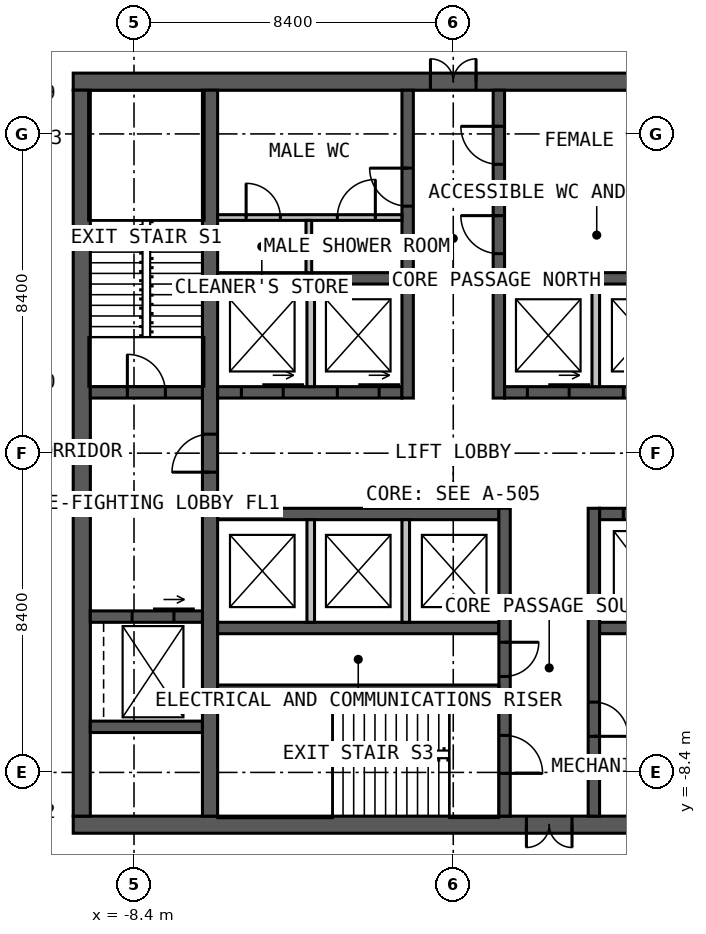
"""IFC4 building model, lengths in metres.
Left out: names, types, materials, properties, quantities, classifications, styles, units other than length and angle.
Written with IfcOpenShell. Run it as: python <this file> out.ifc"""

import sys

from ifc_helpers import new_model, si_unit, direction, frame, frame_2d, origin, place, context, subcontext, project, spatial, rectangle, extrude, element, fill, save


model = new_model("IFC4")
c1 = context("Model", 3, precision=1e-05, world=origin(), true_north=direction((0.0, 1.0)))
c2 = subcontext(c1, "Body", "Model", "MODEL_VIEW")
j1 = project(units=[si_unit("LENGTHUNIT", "METRE"), si_unit("PLANEANGLEUNIT", "RADIAN")], contexts=[c1])
p1 = place(None, origin())
s1 = spatial("IfcSite", under=j1, at=p1, CompositionType="ELEMENT")
p2 = place(p1, origin())
s2 = spatial("IfcBuilding", under=s1, at=p2, CompositionType="ELEMENT")
p3 = place(p2, frame((0.0, 0.0, 183.0)))
s3 = spatial("IfcBuildingStorey", under=s2, at=p3, CompositionType="ELEMENT", Elevation=183.0)
p4 = place(p3, frame((-10.0, 9.775, 0.0), z_axis=(0.0, 0.0, 1.0), x_axis=(1.0, 0.0, 0.0)))
e1 = element("IfcWall", 1, at=p4, inside=s3, PredefinedType="SOLIDWALL", context=c2, shape_type="SweptSolid", body=[
    extrude(rectangle(XDim=20.0, YDim=0.45, at=frame_2d((10.0, 0.0))), origin(), (0.0, 0.0, 1.0), 4.0),
])
p5 = place(p4, frame((9.4, 0.0, 0.0)))
e2 = element("IfcOpeningElement", 2, at=p5, cuts=e1, PredefinedType="OPENING", context=c2, shape_type="SweptSolid", body=[
    extrude(rectangle(XDim=1.2, YDim=2.2, at=frame_2d((0.6, 1.1))), frame((0.0, 0.235, 0.0), z_axis=(0.0, -1.0, 0.0), x_axis=(1.0, 0.0, 0.0)), (0.0, 0.0, 1.0), 0.47),
])
p6 = place(p3, frame((10.0, -9.775, 0.0), z_axis=(0.0, 0.0, 1.0), x_axis=(-1.0, 0.0, 0.0)))
e3 = element("IfcWall", 3, at=p6, inside=s3, PredefinedType="SOLIDWALL", context=c2, shape_type="SweptSolid", body=[
    extrude(rectangle(XDim=20.0, YDim=0.45, at=frame_2d((10.0, 0.0))), origin(), (0.0, 0.0, 1.0), 4.0),
])
p7 = place(p6, frame((6.875, 0.0, 0.0)))
e4 = element("IfcOpeningElement", 4, at=p7, cuts=e3, PredefinedType="OPENING", context=c2, shape_type="SweptSolid", body=[
    extrude(rectangle(XDim=1.2, YDim=2.2, at=frame_2d((0.6, 1.1))), frame((0.0, 0.235, 0.0), z_axis=(0.0, -1.0, 0.0), x_axis=(1.0, 0.0, 0.0)), (0.0, 0.0, 1.0), 0.47),
])
p8 = place(p3, frame((-9.775, 9.55, 0.0), z_axis=(0.0, 0.0, 1.0), x_axis=(0.0, -1.0, 0.0)))
e5 = element("IfcWall", 5, at=p8, inside=s3, PredefinedType="SOLIDWALL", context=c2, shape_type="SweptSolid", body=[
    extrude(rectangle(XDim=19.1, YDim=0.45, at=frame_2d((9.55, 0.0))), origin(), (0.0, 0.0, 1.0), 4.0),
])
p9 = place(p3, frame((-6.4, -9.55, 0.0), z_axis=(0.0, 0.0, 1.0), x_axis=(0.0, 1.0, 0.0)))
e6 = element("IfcWall", 6, at=p9, inside=s3, PredefinedType="SOLIDWALL", context=c2, shape_type="SweptSolid", body=[
    extrude(rectangle(XDim=19.1, YDim=0.4, at=frame_2d((9.55, 0.0))), origin(), (0.0, 0.0, 1.0), 4.0),
])
p10 = place(p9, frame((9.05, 0.0, 0.0)))
e7 = element("IfcOpeningElement", 7, at=p10, cuts=e6, PredefinedType="OPENING", context=c2, shape_type="SweptSolid", body=[
    extrude(rectangle(XDim=1.0, YDim=2.2, at=frame_2d((0.5, 1.1))), frame((0.0, 0.21, 0.0), z_axis=(0.0, -1.0, 0.0), x_axis=(1.0, 0.0, 0.0)), (0.0, 0.0, 1.0), 0.42),
])
p11 = place(p3, frame((-6.2, 1.6, 0.0), z_axis=(0.0, 0.0, 1.0), x_axis=(1.0, 0.0, 0.0)))
e8 = element("IfcWall", 8, at=p11, inside=s3, PredefinedType="SOLIDWALL", context=c2, shape_type="SweptSolid", body=[
    extrude(rectangle(XDim=4.85, YDim=0.3, at=frame_2d((2.425, 0.0))), origin(), (0.0, 0.0, 1.0), 4.0),
])
p12 = place(p11, frame((0.625, 0.0, 0.0)))
e9 = element("IfcOpeningElement", 9, at=p12, cuts=e8, PredefinedType="OPENING", context=c2, shape_type="SweptSolid", body=[
    extrude(rectangle(XDim=1.1, YDim=2.2, at=frame_2d((0.55, 1.1))), frame((0.0, 0.16, 0.0), z_axis=(0.0, -1.0, 0.0), x_axis=(1.0, 0.0, 0.0)), (0.0, 0.0, 1.0), 0.32),
])
p13 = place(p11, frame((3.15, 0.0, 0.0)))
e10 = element("IfcOpeningElement", 10, at=p13, cuts=e8, PredefinedType="OPENING", context=c2, shape_type="SweptSolid", body=[
    extrude(rectangle(XDim=1.1, YDim=2.2, at=frame_2d((0.55, 1.1))), frame((0.0, 0.16, 0.0), z_axis=(0.0, -1.0, 0.0), x_axis=(1.0, 0.0, 0.0)), (0.0, 0.0, 1.0), 0.32),
])
p14 = place(p3, frame((1.35, 1.6, 0.0), z_axis=(0.0, 0.0, 1.0), x_axis=(1.0, 0.0, 0.0)))
e11 = element("IfcWall", 11, at=p14, inside=s3, PredefinedType="SOLIDWALL", context=c2, shape_type="SweptSolid", body=[
    extrude(rectangle(XDim=4.85, YDim=0.3, at=frame_2d((2.425, 0.0))), origin(), (0.0, 0.0, 1.0), 4.0),
])
p15 = place(p14, frame((0.6, 0.0, 0.0)))
e12 = element("IfcOpeningElement", 12, at=p15, cuts=e11, PredefinedType="OPENING", context=c2, shape_type="SweptSolid", body=[
    extrude(rectangle(XDim=1.1, YDim=2.2, at=frame_2d((0.55, 1.1))), frame((0.0, 0.16, 0.0), z_axis=(0.0, -1.0, 0.0), x_axis=(1.0, 0.0, 0.0)), (0.0, 0.0, 1.0), 0.32),
])
p16 = place(p14, frame((3.125, 0.0, 0.0)))
e13 = element("IfcOpeningElement", 13, at=p16, cuts=e11, PredefinedType="OPENING", context=c2, shape_type="SweptSolid", body=[
    extrude(rectangle(XDim=1.1, YDim=2.2, at=frame_2d((0.55, 1.1))), frame((0.0, 0.16, 0.0), z_axis=(0.0, -1.0, 0.0), x_axis=(1.0, 0.0, 0.0)), (0.0, 0.0, 1.0), 0.32),
])
for number, where, z_axis, x_axis in (
    (14, (-6.2, 4.6, 0.0), (0.0, 0.0, 1.0), (1.0, 0.0, 0.0)),
    (15, (1.35, 4.6, 0.0), (0.0, 0.0, 1.0), (1.0, 0.0, 0.0)),
):
    element("IfcWall", number, at=place(p3, frame(where, z_axis=z_axis, x_axis=x_axis)), inside=s3, PredefinedType="SOLIDWALL", context=c2, shape_type="SweptSolid", body=[
        extrude(rectangle(XDim=4.85, YDim=0.3, at=frame_2d((2.425, 0.0))), origin(), (0.0, 0.0, 1.0), 4.0),
    ])
p17 = place(p3, frame((-1.2, 1.45, 0.0), z_axis=(0.0, 0.0, 1.0), x_axis=(0.0, 1.0, 0.0)))
e16 = element("IfcWall", 16, at=p17, inside=s3, PredefinedType="SOLIDWALL", context=c2, shape_type="SweptSolid", body=[
    extrude(rectangle(XDim=8.1, YDim=0.3, at=frame_2d((4.05, 0.0))), origin(), (0.0, 0.0, 1.0), 4.0),
])
p18 = place(p17, frame((5.05, 0.0, 0.0)))
e17 = element("IfcOpeningElement", 17, at=p18, cuts=e16, PredefinedType="OPENING", context=c2, shape_type="SweptSolid", body=[
    extrude(rectangle(XDim=1.0, YDim=2.2, at=frame_2d((0.5, 1.1))), frame((0.0, 0.16, 0.0), z_axis=(0.0, -1.0, 0.0), x_axis=(1.0, 0.0, 0.0)), (0.0, 0.0, 1.0), 0.32),
])
p19 = place(p3, frame((1.2, 1.45, 0.0), z_axis=(0.0, 0.0, 1.0), x_axis=(0.0, 1.0, 0.0)))
e18 = element("IfcWall", 18, at=p19, inside=s3, PredefinedType="SOLIDWALL", context=c2, shape_type="SweptSolid", body=[
    extrude(rectangle(XDim=8.1, YDim=0.3, at=frame_2d((4.05, 0.0))), origin(), (0.0, 0.0, 1.0), 4.0),
])
p20 = place(p19, frame((3.8, 0.0, 0.0)))
e19 = element("IfcOpeningElement", 19, at=p20, cuts=e18, PredefinedType="OPENING", context=c2, shape_type="SweptSolid", body=[
    extrude(rectangle(XDim=1.0, YDim=2.2, at=frame_2d((0.5, 1.1))), frame((0.0, 0.16, 0.0), z_axis=(0.0, -1.0, 0.0), x_axis=(1.0, 0.0, 0.0)), (0.0, 0.0, 1.0), 0.32),
])
p21 = place(p19, frame((6.15, 0.0, 0.0)))
e20 = element("IfcOpeningElement", 20, at=p21, cuts=e18, PredefinedType="OPENING", context=c2, shape_type="SweptSolid", body=[
    extrude(rectangle(XDim=1.0, YDim=2.2, at=frame_2d((0.5, 1.1))), frame((0.0, 0.16, 0.0), z_axis=(0.0, -1.0, 0.0), x_axis=(1.0, 0.0, 0.0)), (0.0, 0.0, 1.0), 0.32),
])
p22 = place(p3, frame((-6.2, -1.6, 0.0), z_axis=(0.0, 0.0, 1.0), x_axis=(1.0, 0.0, 0.0)))
e21 = element("IfcWall", 21, at=p22, inside=s3, PredefinedType="SOLIDWALL", context=c2, shape_type="SweptSolid", body=[
    extrude(rectangle(XDim=7.4, YDim=0.3, at=frame_2d((3.7, 0.0))), origin(), (0.0, 0.0, 1.0), 4.0),
])
p23 = place(p3, frame((3.85, -1.6, 0.0), z_axis=(0.0, 0.0, 1.0), x_axis=(1.0, 0.0, 0.0)))
e22 = element("IfcWall", 22, at=p23, inside=s3, PredefinedType="SOLIDWALL", context=c2, shape_type="SweptSolid", body=[
    extrude(rectangle(XDim=2.35, YDim=0.3, at=frame_2d((1.175, 0.0))), origin(), (0.0, 0.0, 1.0), 4.0),
])
p24 = place(p23, frame((0.625, 0.0, 0.0)))
e23 = element("IfcOpeningElement", 23, at=p24, cuts=e22, PredefinedType="OPENING", context=c2, shape_type="SweptSolid", body=[
    extrude(rectangle(XDim=1.1, YDim=2.2, at=frame_2d((0.55, 1.1))), frame((0.0, 0.16, 0.0), z_axis=(0.0, -1.0, 0.0), x_axis=(1.0, 0.0, 0.0)), (0.0, 0.0, 1.0), 0.32),
])
p25 = place(p3, frame((-6.2, -4.6, 0.0), z_axis=(0.0, 0.0, 1.0), x_axis=(1.0, 0.0, 0.0)))
e24 = element("IfcWall", 24, at=p25, inside=s3, PredefinedType="SOLIDWALL", context=c2, shape_type="SweptSolid", body=[
    extrude(rectangle(XDim=7.4, YDim=0.3, at=frame_2d((3.7, 0.0))), origin(), (0.0, 0.0, 1.0), 4.0),
])
p26 = place(p3, frame((3.85, -4.6, 0.0), z_axis=(0.0, 0.0, 1.0), x_axis=(1.0, 0.0, 0.0)))
e25 = element("IfcWall", 25, at=p26, inside=s3, PredefinedType="SOLIDWALL", context=c2, shape_type="SweptSolid", body=[
    extrude(rectangle(XDim=2.35, YDim=0.3, at=frame_2d((1.175, 0.0))), origin(), (0.0, 0.0, 1.0), 4.0),
])
p27 = place(p3, frame((1.35, -1.45, 0.0), z_axis=(0.0, 0.0, 1.0), x_axis=(0.0, -1.0, 0.0)))
e26 = element("IfcWall", 26, at=p27, inside=s3, PredefinedType="SOLIDWALL", context=c2, shape_type="SweptSolid", body=[
    extrude(rectangle(XDim=8.1, YDim=0.3, at=frame_2d((4.05, 0.0))), origin(), (0.0, 0.0, 1.0), 4.0),
])
p28 = place(p27, frame((5.975, 0.0, 0.0)))
e27 = element("IfcOpeningElement", 27, at=p28, cuts=e26, PredefinedType="OPENING", context=c2, shape_type="SweptSolid", body=[
    extrude(rectangle(XDim=1.0, YDim=2.2, at=frame_2d((0.5, 1.1))), frame((0.0, 0.16, 0.0), z_axis=(0.0, -1.0, 0.0), x_axis=(1.0, 0.0, 0.0)), (0.0, 0.0, 1.0), 0.32),
])
p29 = place(p27, frame((3.525, 0.0, 0.0)))
e28 = element("IfcOpeningElement", 28, at=p29, cuts=e26, PredefinedType="OPENING", context=c2, shape_type="SweptSolid", body=[
    extrude(rectangle(XDim=0.9, YDim=2.2, at=frame_2d((0.45, 1.1))), frame((0.0, 0.16, 0.0), z_axis=(0.0, -1.0, 0.0), x_axis=(1.0, 0.0, 0.0)), (0.0, 0.0, 1.0), 0.32),
])
p30 = place(p3, frame((3.7, -1.45, 0.0), z_axis=(0.0, 0.0, 1.0), x_axis=(0.0, -1.0, 0.0)))
e29 = element("IfcWall", 29, at=p30, inside=s3, PredefinedType="SOLIDWALL", context=c2, shape_type="SweptSolid", body=[
    extrude(rectangle(XDim=8.1, YDim=0.3, at=frame_2d((4.05, 0.0))), origin(), (0.0, 0.0, 1.0), 4.0),
])
p31 = place(p30, frame((5.1, 0.0, 0.0)))
e30 = element("IfcOpeningElement", 30, at=p31, cuts=e29, PredefinedType="OPENING", context=c2, shape_type="SweptSolid", body=[
    extrude(rectangle(XDim=0.9, YDim=2.2, at=frame_2d((0.45, 1.1))), frame((0.0, 0.16, 0.0), z_axis=(0.0, -1.0, 0.0), x_axis=(1.0, 0.0, 0.0)), (0.0, 0.0, 1.0), 0.32),
])
p32 = place(p3, frame((-6.2, -6.2, 0.0), z_axis=(0.0, 0.0, 1.0), x_axis=(1.0, 0.0, 0.0)))
e31 = element("IfcWall", 31, at=p32, inside=s3, PredefinedType="SOLIDWALL", context=c2, shape_type="SweptSolid", body=[
    extrude(rectangle(XDim=7.4, YDim=0.2, at=frame_2d((3.7, 0.0))), origin(), (0.0, 0.0, 1.0), 4.0),
])
p33 = place(p3, frame((-9.55, 1.6, 0.0), z_axis=(0.0, 0.0, 1.0), x_axis=(1.0, 0.0, 0.0)))
e32 = element("IfcWall", 32, at=p33, inside=s3, PredefinedType="SOLIDWALL", context=c2, shape_type="SweptSolid", body=[
    extrude(rectangle(XDim=2.95, YDim=0.3, at=frame_2d((1.475, 0.0))), origin(), (0.0, 0.0, 1.0), 4.0),
])
p34 = place(p33, frame((0.975, 0.0, 0.0)))
e33 = element("IfcOpeningElement", 33, at=p34, cuts=e32, PredefinedType="OPENING", context=c2, shape_type="SweptSolid", body=[
    extrude(rectangle(XDim=1.0, YDim=2.2, at=frame_2d((0.5, 1.1))), frame((0.0, 0.16, 0.0), z_axis=(0.0, -1.0, 0.0), x_axis=(1.0, 0.0, 0.0)), (0.0, 0.0, 1.0), 0.32),
])
p35 = place(p3, frame((-9.55, -4.3, 0.0), z_axis=(0.0, 0.0, 1.0), x_axis=(1.0, 0.0, 0.0)))
e34 = element("IfcWall", 34, at=p35, inside=s3, PredefinedType="SOLIDWALL", context=c2, shape_type="SweptSolid", body=[
    extrude(rectangle(XDim=2.95, YDim=0.3, at=frame_2d((1.475, 0.0))), origin(), (0.0, 0.0, 1.0), 4.0),
])
p36 = place(p35, frame((1.1, 0.0, 0.0)))
e35 = element("IfcOpeningElement", 35, at=p36, cuts=e34, PredefinedType="OPENING", context=c2, shape_type="SweptSolid", body=[
    extrude(rectangle(XDim=1.1, YDim=2.2, at=frame_2d((0.55, 1.1))), frame((0.0, 0.16, 0.0), z_axis=(0.0, -1.0, 0.0), x_axis=(1.0, 0.0, 0.0)), (0.0, 0.0, 1.0), 0.32),
])
p37 = place(p3, frame((-9.55, -7.2, 0.0), z_axis=(0.0, 0.0, 1.0), x_axis=(1.0, 0.0, 0.0)))
e36 = element("IfcWall", 36, at=p37, inside=s3, PredefinedType="SOLIDWALL", context=c2, shape_type="SweptSolid", body=[
    extrude(rectangle(XDim=2.95, YDim=0.3, at=frame_2d((1.475, 0.0))), origin(), (0.0, 0.0, 1.0), 4.0),
])
for number, where, z_axis, x_axis in (
    (37, (-3.75, 1.75, 0.0), (0.0, 0.0, 1.0), (0.0, 1.0, 0.0)),
    (38, (3.75, 1.75, 0.0), (0.0, 0.0, 1.0), (0.0, 1.0, 0.0)),
    (39, (-3.75, -1.75, 0.0), (0.0, 0.0, 1.0), (0.0, -1.0, 0.0)),
    (40, (-1.25, -1.75, 0.0), (0.0, 0.0, 1.0), (0.0, -1.0, 0.0)),
):
    element("IfcWall", number, at=place(p3, frame(where, z_axis=z_axis, x_axis=x_axis)), inside=s3, PredefinedType="SOLIDWALL", context=c2, shape_type="SweptSolid", body=[
        extrude(rectangle(XDim=2.7, YDim=0.2, at=frame_2d((1.35, 0.0))), origin(), (0.0, 0.0, 1.0), 3.75),
    ])
p38 = place(p3, frame((1.35, 6.8, 0.0), z_axis=(0.0, 0.0, 1.0), x_axis=(1.0, 0.0, 0.0)))
e41 = element("IfcWall", 41, at=p38, inside=s3, PredefinedType="PARTITIONING", context=c2, shape_type="SweptSolid", body=[
    extrude(rectangle(XDim=4.85, YDim=0.15, at=frame_2d((2.425, 0.0))), origin(), (0.0, 0.0, 1.0), 3.75),
])
p39 = place(p3, frame((-6.2, 6.2, 0.0), z_axis=(0.0, 0.0, 1.0), x_axis=(1.0, 0.0, 0.0)))
e42 = element("IfcWall", 42, at=p39, inside=s3, PredefinedType="PARTITIONING", context=c2, shape_type="SweptSolid", body=[
    extrude(rectangle(XDim=4.85, YDim=0.15, at=frame_2d((2.425, 0.0))), origin(), (0.0, 0.0, 1.0), 3.75),
])
p40 = place(p39, frame((3.15, 0.0, 0.0)))
e43 = element("IfcOpeningElement", 43, at=p40, cuts=e42, PredefinedType="OPENING", context=c2, shape_type="SweptSolid", body=[
    extrude(rectangle(XDim=1.0, YDim=2.2, at=frame_2d((0.5, 1.1))), frame((0.0, 0.085, 0.0), z_axis=(0.0, -1.0, 0.0), x_axis=(1.0, 0.0, 0.0)), (0.0, 0.0, 1.0), 0.17),
])
p41 = place(p39, frame((0.75, 0.0, 0.0)))
e44 = element("IfcOpeningElement", 44, at=p41, cuts=e42, PredefinedType="OPENING", context=c2, shape_type="SweptSolid", body=[
    extrude(rectangle(XDim=0.9, YDim=2.2, at=frame_2d((0.45, 1.1))), frame((0.0, 0.085, 0.0), z_axis=(0.0, -1.0, 0.0), x_axis=(1.0, 0.0, 0.0)), (0.0, 0.0, 1.0), 0.17),
])
p42 = place(p3, frame((-3.8, 4.75, 0.0), z_axis=(0.0, 0.0, 1.0), x_axis=(0.0, 1.0, 0.0)))
e45 = element("IfcWall", 45, at=p42, inside=s3, PredefinedType="PARTITIONING", context=c2, shape_type="SweptSolid", body=[
    extrude(rectangle(XDim=1.375, YDim=0.15, at=frame_2d((0.688, 0.0))), origin(), (0.0, 0.0, 1.0), 3.75),
])
p43 = place(p5, origin())
e46 = element("IfcDoor", 46, at=p43, inside=s3, OperationType="DOUBLE_DOOR_SINGLE_SWING", PredefinedType="DOOR", context=c2, shape_type="SweptSolid", body=[
    extrude(rectangle(XDim=1.2, YDim=2.2, at=frame_2d((0.6, 1.1))), frame((0.0, 0.025, 0.0), z_axis=(0.0, -1.0, 0.0), x_axis=(1.0, 0.0, 0.0)), (0.0, 0.0, 1.0), 0.05),
])
fill(e2, e46)
p44 = place(p7, origin())
e47 = element("IfcDoor", 47, at=p44, inside=s3, OperationType="DOUBLE_DOOR_SINGLE_SWING", PredefinedType="DOOR", context=c2, shape_type="SweptSolid", body=[
    extrude(rectangle(XDim=1.2, YDim=2.2, at=frame_2d((0.6, 1.1))), frame((0.0, 0.025, 0.0), z_axis=(0.0, -1.0, 0.0), x_axis=(1.0, 0.0, 0.0)), (0.0, 0.0, 1.0), 0.05),
])
fill(e4, e47)
p45 = place(p10, origin())
e48 = element("IfcDoor", 48, at=p45, inside=s3, OperationType="SINGLE_SWING_LEFT", PredefinedType="DOOR", context=c2, shape_type="SweptSolid", body=[
    extrude(rectangle(XDim=1.0, YDim=2.2, at=frame_2d((0.5, 1.1))), frame((0.0, 0.025, 0.0), z_axis=(0.0, -1.0, 0.0), x_axis=(1.0, 0.0, 0.0)), (0.0, 0.0, 1.0), 0.05),
])
fill(e7, e48)
p46 = place(p34, origin())
e49 = element("IfcDoor", 49, at=p46, inside=s3, OperationType="SINGLE_SWING_LEFT", PredefinedType="DOOR", context=c2, shape_type="SweptSolid", body=[
    extrude(rectangle(XDim=1.0, YDim=2.2, at=frame_2d((0.5, 1.1))), frame((0.0, 0.025, 0.0), z_axis=(0.0, -1.0, 0.0), x_axis=(1.0, 0.0, 0.0)), (0.0, 0.0, 1.0), 0.05),
])
fill(e33, e49)
p47 = place(p28, origin())
e50 = element("IfcDoor", 50, at=p47, inside=s3, OperationType="SINGLE_SWING_RIGHT", PredefinedType="DOOR", context=c2, shape_type="SweptSolid", body=[
    extrude(rectangle(XDim=1.0, YDim=2.2, at=frame_2d((0.5, 1.1))), frame((0.0, 0.025, 0.0), z_axis=(0.0, -1.0, 0.0), x_axis=(1.0, 0.0, 0.0)), (0.0, 0.0, 1.0), 0.05),
])
fill(e27, e50)
p48 = place(p18, origin())
e51 = element("IfcDoor", 51, at=p48, inside=s3, OperationType="SINGLE_SWING_RIGHT", PredefinedType="DOOR", context=c2, shape_type="SweptSolid", body=[
    extrude(rectangle(XDim=1.0, YDim=2.2, at=frame_2d((0.5, 1.1))), frame((0.0, 0.025, 0.0), z_axis=(0.0, -1.0, 0.0), x_axis=(1.0, 0.0, 0.0)), (0.0, 0.0, 1.0), 0.05),
])
fill(e17, e51)
p49 = place(p20, origin())
e52 = element("IfcDoor", 52, at=p49, inside=s3, OperationType="SINGLE_SWING_RIGHT", PredefinedType="DOOR", context=c2, shape_type="SweptSolid", body=[
    extrude(rectangle(XDim=1.0, YDim=2.2, at=frame_2d((0.5, 1.1))), frame((0.0, 0.025, 0.0), z_axis=(0.0, -1.0, 0.0), x_axis=(1.0, 0.0, 0.0)), (0.0, 0.0, 1.0), 0.05),
])
fill(e19, e52)
p50 = place(p21, origin())
e53 = element("IfcDoor", 53, at=p50, inside=s3, OperationType="SINGLE_SWING_RIGHT", PredefinedType="DOOR", context=c2, shape_type="SweptSolid", body=[
    extrude(rectangle(XDim=1.0, YDim=2.2, at=frame_2d((0.5, 1.1))), frame((0.0, 0.025, 0.0), z_axis=(0.0, -1.0, 0.0), x_axis=(1.0, 0.0, 0.0)), (0.0, 0.0, 1.0), 0.05),
])
fill(e20, e53)
p51 = place(p29, origin())
e54 = element("IfcDoor", 54, at=p51, inside=s3, OperationType="SINGLE_SWING_LEFT", PredefinedType="DOOR", context=c2, shape_type="SweptSolid", body=[
    extrude(rectangle(XDim=0.9, YDim=2.2, at=frame_2d((0.45, 1.1))), frame((0.0, 0.025, 0.0), z_axis=(0.0, -1.0, 0.0), x_axis=(1.0, 0.0, 0.0)), (0.0, 0.0, 1.0), 0.05),
])
fill(e28, e54)
p52 = place(p31, origin())
e55 = element("IfcDoor", 55, at=p52, inside=s3, OperationType="SINGLE_SWING_RIGHT", PredefinedType="DOOR", context=c2, shape_type="SweptSolid", body=[
    extrude(rectangle(XDim=0.9, YDim=2.2, at=frame_2d((0.45, 1.1))), frame((0.0, 0.025, 0.0), z_axis=(0.0, -1.0, 0.0), x_axis=(1.0, 0.0, 0.0)), (0.0, 0.0, 1.0), 0.05),
])
fill(e30, e55)
p53 = place(p40, origin())
e56 = element("IfcDoor", 56, at=p53, inside=s3, OperationType="SINGLE_SWING_RIGHT", PredefinedType="DOOR", context=c2, shape_type="SweptSolid", body=[
    extrude(rectangle(XDim=1.0, YDim=2.2, at=frame_2d((0.5, 1.1))), frame((0.0, 0.025, 0.0), z_axis=(0.0, -1.0, 0.0), x_axis=(1.0, 0.0, 0.0)), (0.0, 0.0, 1.0), 0.05),
])
fill(e43, e56)
p54 = place(p41, origin())
e57 = element("IfcDoor", 57, at=p54, inside=s3, OperationType="SINGLE_SWING_LEFT", PredefinedType="DOOR", context=c2, shape_type="SweptSolid", body=[
    extrude(rectangle(XDim=0.9, YDim=2.2, at=frame_2d((0.45, 1.1))), frame((0.0, 0.025, 0.0), z_axis=(0.0, -1.0, 0.0), x_axis=(1.0, 0.0, 0.0)), (0.0, 0.0, 1.0), 0.05),
])
fill(e44, e57)
p55 = place(p12, origin())
e58 = element("IfcDoor", 58, at=p55, inside=s3, OperationType="SLIDING_TO_LEFT", PredefinedType="DOOR", context=c2, shape_type="SweptSolid", body=[
    extrude(rectangle(XDim=1.1, YDim=2.2, at=frame_2d((0.55, 1.1))), frame((0.0, 0.025, 0.0), z_axis=(0.0, -1.0, 0.0), x_axis=(1.0, 0.0, 0.0)), (0.0, 0.0, 1.0), 0.05),
])
fill(e9, e58)
p56 = place(p13, origin())
e59 = element("IfcDoor", 59, at=p56, inside=s3, OperationType="SLIDING_TO_LEFT", PredefinedType="DOOR", context=c2, shape_type="SweptSolid", body=[
    extrude(rectangle(XDim=1.1, YDim=2.2, at=frame_2d((0.55, 1.1))), frame((0.0, 0.025, 0.0), z_axis=(0.0, -1.0, 0.0), x_axis=(1.0, 0.0, 0.0)), (0.0, 0.0, 1.0), 0.05),
])
fill(e10, e59)
p57 = place(p15, origin())
e60 = element("IfcDoor", 60, at=p57, inside=s3, OperationType="SLIDING_TO_LEFT", PredefinedType="DOOR", context=c2, shape_type="SweptSolid", body=[
    extrude(rectangle(XDim=1.1, YDim=2.2, at=frame_2d((0.55, 1.1))), frame((0.0, 0.025, 0.0), z_axis=(0.0, -1.0, 0.0), x_axis=(1.0, 0.0, 0.0)), (0.0, 0.0, 1.0), 0.05),
])
fill(e12, e60)
p58 = place(p16, origin())
e61 = element("IfcDoor", 61, at=p58, inside=s3, OperationType="SLIDING_TO_LEFT", PredefinedType="DOOR", context=c2, shape_type="SweptSolid", body=[
    extrude(rectangle(XDim=1.1, YDim=2.2, at=frame_2d((0.55, 1.1))), frame((0.0, 0.025, 0.0), z_axis=(0.0, -1.0, 0.0), x_axis=(1.0, 0.0, 0.0)), (0.0, 0.0, 1.0), 0.05),
])
fill(e13, e61)
p59 = place(p24, origin())
e62 = element("IfcDoor", 62, at=p59, inside=s3, OperationType="SLIDING_TO_LEFT", PredefinedType="DOOR", context=c2, shape_type="SweptSolid", body=[
    extrude(rectangle(XDim=1.1, YDim=2.2, at=frame_2d((0.55, 1.1))), frame((0.0, 0.025, 0.0), z_axis=(0.0, -1.0, 0.0), x_axis=(1.0, 0.0, 0.0)), (0.0, 0.0, 1.0), 0.05),
])
fill(e23, e62)
p60 = place(p36, origin())
e63 = element("IfcDoor", 63, at=p60, inside=s3, OperationType="SLIDING_TO_LEFT", PredefinedType="DOOR", context=c2, shape_type="SweptSolid", body=[
    extrude(rectangle(XDim=1.1, YDim=2.2, at=frame_2d((0.55, 1.1))), frame((0.0, 0.025, 0.0), z_axis=(0.0, -1.0, 0.0), x_axis=(1.0, 0.0, 0.0)), (0.0, 0.0, 1.0), 0.05),
])
fill(e35, e63)
save(model, sys.argv[1])
